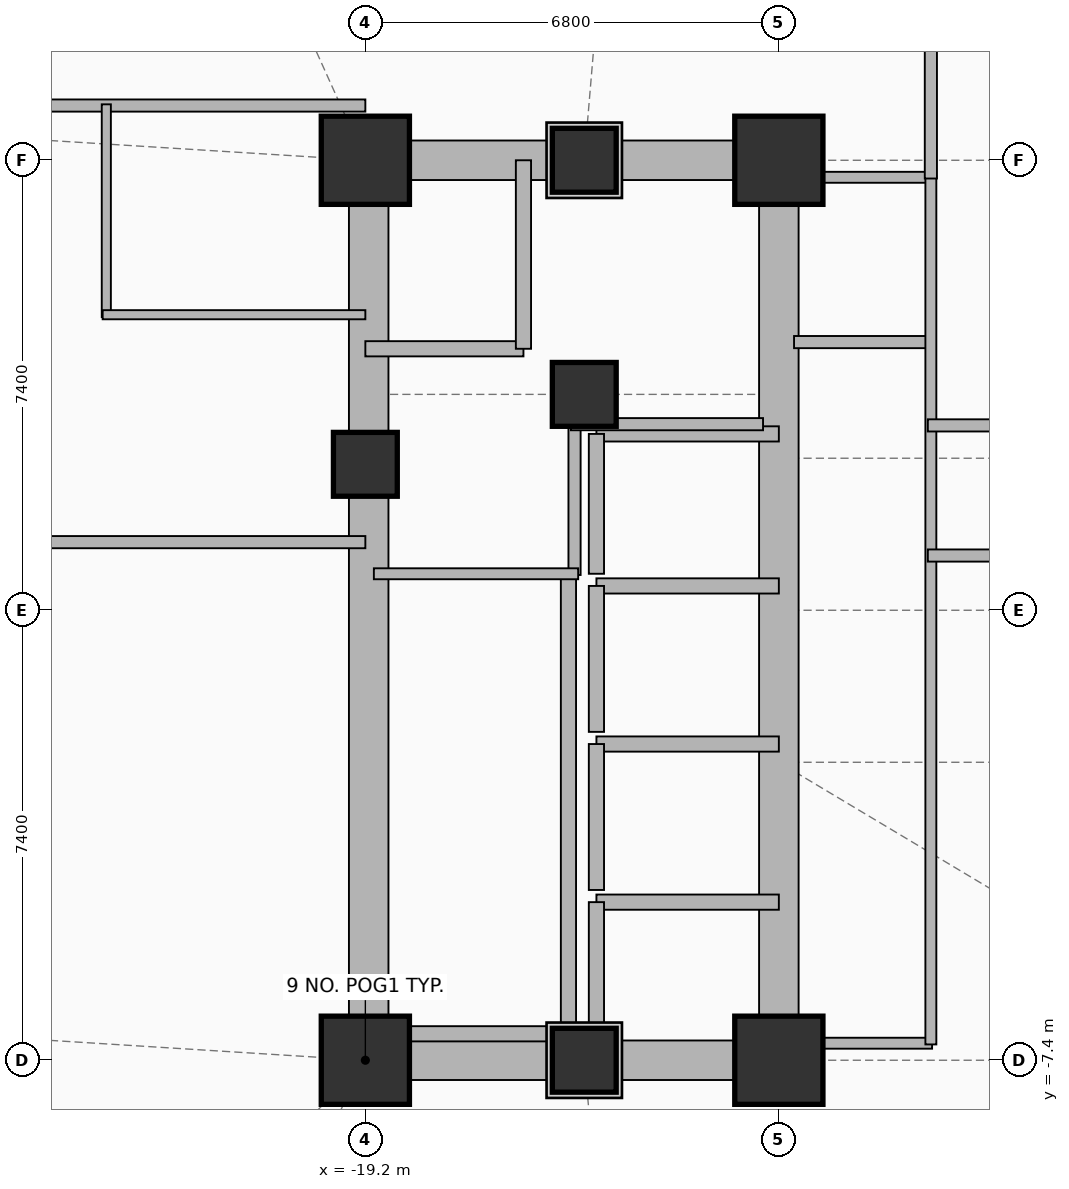
"""IFC4 building model, lengths in metres.
Left out: names, types, materials, properties, quantities, classifications, styles, units other than length and angle.
Written with IfcOpenShell. Run it as: python <this file> out.ifc"""

import sys

from ifc_helpers import new_model, si_unit, direction, frame, frame_2d, origin, origin_2d, place, context, subcontext, project, spatial, rectangle, extrude, element, fill, save


model = new_model("IFC4")
c1 = context("Model", 3, precision=1e-05, world=origin(), true_north=direction((0.0, 1.0)))
c2 = subcontext(c1, "Body", "Model", "MODEL_VIEW")
j1 = project(units=[si_unit("LENGTHUNIT", "METRE"), si_unit("PLANEANGLEUNIT", "RADIAN")], contexts=[c1])
p1 = place(None, origin())
s1 = spatial("IfcSite", under=j1, at=p1, CompositionType="ELEMENT")
p2 = place(p1, origin())
s2 = spatial("IfcBuilding", under=s1, at=p2, CompositionType="ELEMENT")
p3 = place(p2, frame((0.0, 0.0, 80.6)))
s3 = spatial("IfcBuildingStorey", under=s2, at=p3, CompositionType="ELEMENT", Elevation=80.6)
p4 = place(p3, frame((-19.2, -7.4, 0.0), z_axis=(0.0, 0.0, 1.0), x_axis=(1.0, 0.0, 0.0)))
e1 = element("IfcColumn", 1, at=p4, inside=s3, PredefinedType="COLUMN", context=c2, shape_type="SweptSolid", body=[
    extrude(rectangle(XDim=1.45, YDim=1.45, at=origin_2d()), origin(), (0.0, 0.0, 1.0), 5.2),
])
p5 = place(p3, frame((-19.2, 2.4, 0.0), z_axis=(0.0, 0.0, 1.0), x_axis=(1.0, 0.0, 0.0)))
e2 = element("IfcColumn", 2, at=p5, inside=s3, PredefinedType="COLUMN", context=c2, shape_type="SweptSolid", body=[
    extrude(rectangle(XDim=1.05, YDim=1.05, at=origin_2d()), origin(), (0.0, 0.0, 1.0), 5.2),
])
p6 = place(p3, frame((-19.2, 7.4, 0.0), z_axis=(0.0, 0.0, 1.0), x_axis=(1.0, 0.0, 0.0)))
e3 = element("IfcColumn", 3, at=p6, inside=s3, PredefinedType="COLUMN", context=c2, shape_type="SweptSolid", body=[
    extrude(rectangle(XDim=1.45, YDim=1.45, at=origin_2d()), origin(), (0.0, 0.0, 1.0), 5.2),
])
for number, where, z_axis, x_axis in (
    (4, (-15.6, -7.4, 0.0), (0.0, 0.0, 1.0), (1.0, 0.0, 0.0)),
    (5, (-15.6, 7.4, 0.0), (0.0, 0.0, 1.0), (1.0, 0.0, 0.0)),
):
    element("IfcColumn", number, at=place(p3, frame(where, z_axis=z_axis, x_axis=x_axis)), inside=s3, PredefinedType="COLUMN", context=c2, shape_type="SweptSolid", body=[
        extrude(rectangle(XDim=1.05, YDim=1.05, at=origin_2d()), origin(), (0.0, 0.0, 1.0), 5.2),
    ])
p7 = place(p3, frame((-12.4, -7.4, 0.0), z_axis=(0.0, 0.0, 1.0), x_axis=(1.0, 0.0, 0.0)))
e6 = element("IfcColumn", 6, at=p7, inside=s3, PredefinedType="COLUMN", context=c2, shape_type="SweptSolid", body=[
    extrude(rectangle(XDim=1.45, YDim=1.45, at=origin_2d()), origin(), (0.0, 0.0, 1.0), 5.2),
])
p8 = place(p3, frame((-15.6, 3.55, 0.0), z_axis=(0.0, 0.0, 1.0), x_axis=(1.0, 0.0, 0.0)))
e7 = element("IfcColumn", 7, at=p8, inside=s3, PredefinedType="COLUMN", context=c2, shape_type="SweptSolid", body=[
    extrude(rectangle(XDim=1.05, YDim=1.05, at=origin_2d()), origin(), (0.0, 0.0, 1.0), 5.2),
])
p9 = place(p3, frame((-12.4, 7.4, 0.0), z_axis=(0.0, 0.0, 1.0), x_axis=(1.0, 0.0, 0.0)))
e8 = element("IfcColumn", 8, at=p9, inside=s3, PredefinedType="COLUMN", context=c2, shape_type="SweptSolid", body=[
    extrude(rectangle(XDim=1.45, YDim=1.45, at=origin_2d()), origin(), (0.0, 0.0, 1.0), 5.2),
])
for number, where, z_axis, x_axis in (
    (9, (-19.525, -7.4, 0.0), (0.0, 0.0, 1.0), (1.0, 0.0, 0.0)),
    (10, (-19.525, 7.4, 0.0), (0.0, 0.0, 1.0), (1.0, 0.0, 0.0)),
):
    element("IfcWall", number, at=place(p3, frame(where, z_axis=z_axis, x_axis=x_axis)), inside=s3, PredefinedType="SHEAR", context=c2, shape_type="SweptSolid", body=[
        extrude(rectangle(XDim=7.45, YDim=0.65, at=frame_2d((3.725, 0.0))), origin(), (0.0, 0.0, 1.0), 4.8),
    ])
p10 = place(p3, frame((-19.145, -7.4, 0.0), z_axis=(0.0, 0.0, 1.0), x_axis=(0.0, 1.0, 0.0)))
e11 = element("IfcWall", 11, at=p10, inside=s3, PredefinedType="SHEAR", context=c2, shape_type="SweptSolid", body=[
    extrude(rectangle(XDim=14.8, YDim=0.65, at=frame_2d((7.4, 0.0))), origin(), (0.0, 0.0, 1.0), 4.8),
])
p11 = place(p10, frame((10.6, 0.0, 0.0)))
e12 = element("IfcOpeningElement", 12, at=p11, cuts=e11, PredefinedType="OPENING", context=c2, shape_type="SweptSolid", body=[
    extrude(rectangle(XDim=0.9, YDim=2.05, at=frame_2d((0.45, 1.025))), frame((0.0, 0.335, 0.0), z_axis=(0.0, -1.0, 0.0), x_axis=(1.0, 0.0, 0.0)), (0.0, 0.0, 1.0), 0.67),
])
p12 = place(p3, frame((-12.4, -7.4, 0.0), z_axis=(0.0, 0.0, 1.0), x_axis=(0.0, 1.0, 0.0)))
e13 = element("IfcWall", 13, at=p12, inside=s3, PredefinedType="SHEAR", context=c2, shape_type="SweptSolid", body=[
    extrude(rectangle(XDim=14.8, YDim=0.65, at=frame_2d((7.4, 0.0))), origin(), (0.0, 0.0, 1.0), 4.8),
])
p13 = place(p12, frame((0.85, 0.0, 0.0)))
e14 = element("IfcOpeningElement", 14, at=p13, cuts=e13, PredefinedType="OPENING", context=c2, shape_type="SweptSolid", body=[
    extrude(rectangle(XDim=1.1, YDim=2.05, at=frame_2d((0.55, 1.025))), frame((0.0, 0.335, 0.0), z_axis=(0.0, -1.0, 0.0), x_axis=(1.0, 0.0, 0.0)), (0.0, 0.0, 1.0), 0.67),
])
p14 = place(p12, frame((3.45, 0.0, 0.0)))
e15 = element("IfcOpeningElement", 15, at=p14, cuts=e13, PredefinedType="OPENING", context=c2, shape_type="SweptSolid", body=[
    extrude(rectangle(XDim=1.1, YDim=2.05, at=frame_2d((0.55, 1.025))), frame((0.0, 0.335, 0.0), z_axis=(0.0, -1.0, 0.0), x_axis=(1.0, 0.0, 0.0)), (0.0, 0.0, 1.0), 0.67),
])
p15 = place(p12, frame((10.53, 0.0, 0.0)))
e16 = element("IfcOpeningElement", 16, at=p15, cuts=e13, PredefinedType="OPENING", context=c2, shape_type="SweptSolid", body=[
    extrude(rectangle(XDim=1.1, YDim=2.05, at=frame_2d((0.55, 1.025))), frame((0.0, 0.335, 0.0), z_axis=(0.0, -1.0, 0.0), x_axis=(1.0, 0.0, 0.0)), (0.0, 0.0, 1.0), 0.67),
])
p16 = place(p3, frame((-15.86, -7.085, 0.0), z_axis=(0.0, 0.0, 1.0), x_axis=(0.0, 1.0, 0.0)))
e17 = element("IfcWall", 17, at=p16, inside=s3, PredefinedType="SOLIDWALL", context=c2, shape_type="SweptSolid", body=[
    extrude(rectangle(XDim=7.685, YDim=0.25, at=frame_2d((3.843, 0.0))), origin(), (0.0, 0.0, 1.0), 4.8),
])
p17 = place(p3, frame((-19.2, -6.965, 0.0), z_axis=(0.0, 0.0, 1.0), x_axis=(1.0, 0.0, 0.0)))
e18 = element("IfcWall", 18, at=p17, inside=s3, PredefinedType="SOLIDWALL", context=c2, shape_type="SweptSolid", body=[
    extrude(rectangle(XDim=3.46, YDim=0.25, at=frame_2d((1.73, 0.0))), origin(), (0.0, 0.0, 1.0), 4.8),
])
p18 = place(p3, frame((-19.2, 4.3, 0.0), z_axis=(0.0, 0.0, 1.0), x_axis=(1.0, 0.0, 0.0)))
e19 = element("IfcWall", 19, at=p18, inside=s3, PredefinedType="SOLIDWALL", context=c2, shape_type="SweptSolid", body=[
    extrude(rectangle(XDim=2.6, YDim=0.25, at=frame_2d((1.3, 0.0))), origin(), (0.0, 0.0, 1.0), 4.8),
])
p19 = place(p3, frame((-16.6, 4.3, 0.0), z_axis=(0.0, 0.0, 1.0), x_axis=(0.0, 1.0, 0.0)))
e20 = element("IfcWall", 20, at=p19, inside=s3, PredefinedType="SOLIDWALL", context=c2, shape_type="SweptSolid", body=[
    extrude(rectangle(XDim=3.1, YDim=0.25, at=frame_2d((1.55, 0.0))), origin(), (0.0, 0.0, 1.0), 4.8),
])
p20 = place(p19, frame((0.95, 0.0, 0.0)))
e21 = element("IfcOpeningElement", 21, at=p20, cuts=e20, PredefinedType="OPENING", context=c2, shape_type="SweptSolid", body=[
    extrude(rectangle(XDim=1.2, YDim=2.05, at=frame_2d((0.6, 1.025))), frame((0.0, 0.135, 0.0), z_axis=(0.0, -1.0, 0.0), x_axis=(1.0, 0.0, 0.0)), (0.0, 0.0, 1.0), 0.27),
])
p21 = place(p3, frame((-12.4, -4.8, 0.0), z_axis=(0.0, 0.0, 1.0), x_axis=(-1.0, 0.0, 0.0)))
e22 = element("IfcWall", 22, at=p21, inside=s3, PredefinedType="SOLIDWALL", context=c2, shape_type="SweptSolid", body=[
    extrude(rectangle(XDim=3.0, YDim=0.25, at=frame_2d((1.5, 0.0))), origin(), (0.0, 0.0, 1.0), 4.8),
])
p22 = place(p3, frame((-15.4, -4.8, 0.0), z_axis=(0.0, 0.0, 1.0), x_axis=(0.0, -1.0, 0.0)))
e23 = element("IfcWall", 23, at=p22, inside=s3, PredefinedType="SOLIDWALL", context=c2, shape_type="SweptSolid", body=[
    extrude(rectangle(XDim=2.6, YDim=0.25, at=frame_2d((1.3, 0.0))), origin(), (0.0, 0.0, 1.0), 4.8),
])
p23 = place(p3, frame((-12.4, -2.2, 0.0), z_axis=(0.0, 0.0, 1.0), x_axis=(-1.0, 0.0, 0.0)))
e24 = element("IfcWall", 24, at=p23, inside=s3, PredefinedType="SOLIDWALL", context=c2, shape_type="SweptSolid", body=[
    extrude(rectangle(XDim=3.0, YDim=0.25, at=frame_2d((1.5, 0.0))), origin(), (0.0, 0.0, 1.0), 4.8),
])
p24 = place(p3, frame((-15.4, -2.2, 0.0), z_axis=(0.0, 0.0, 1.0), x_axis=(0.0, -1.0, 0.0)))
e25 = element("IfcWall", 25, at=p24, inside=s3, PredefinedType="SOLIDWALL", context=c2, shape_type="SweptSolid", body=[
    extrude(rectangle(XDim=2.4, YDim=0.25, at=frame_2d((1.2, 0.0))), origin(), (0.0, 0.0, 1.0), 4.8),
])
p25 = place(p3, frame((-12.4, 0.4, 0.0), z_axis=(0.0, 0.0, 1.0), x_axis=(-1.0, 0.0, 0.0)))
e26 = element("IfcWall", 26, at=p25, inside=s3, PredefinedType="SOLIDWALL", context=c2, shape_type="SweptSolid", body=[
    extrude(rectangle(XDim=3.0, YDim=0.25, at=frame_2d((1.5, 0.0))), origin(), (0.0, 0.0, 1.0), 4.8),
])
p26 = place(p3, frame((-15.4, 0.4, 0.0), z_axis=(0.0, 0.0, 1.0), x_axis=(0.0, -1.0, 0.0)))
e27 = element("IfcWall", 27, at=p26, inside=s3, PredefinedType="SOLIDWALL", context=c2, shape_type="SweptSolid", body=[
    extrude(rectangle(XDim=2.4, YDim=0.25, at=frame_2d((1.2, 0.0))), origin(), (0.0, 0.0, 1.0), 4.8),
])
p27 = place(p3, frame((-12.4, 2.9, 0.0), z_axis=(0.0, 0.0, 1.0), x_axis=(-1.0, 0.0, 0.0)))
e28 = element("IfcWall", 28, at=p27, inside=s3, PredefinedType="SOLIDWALL", context=c2, shape_type="SweptSolid", body=[
    extrude(rectangle(XDim=3.0, YDim=0.25, at=frame_2d((1.5, 0.0))), origin(), (0.0, 0.0, 1.0), 4.8),
])
p28 = place(p3, frame((-15.4, 2.9, 0.0), z_axis=(0.0, 0.0, 1.0), x_axis=(0.0, -1.0, 0.0)))
e29 = element("IfcWall", 29, at=p28, inside=s3, PredefinedType="SOLIDWALL", context=c2, shape_type="SweptSolid", body=[
    extrude(rectangle(XDim=2.3, YDim=0.25, at=frame_2d((1.15, 0.0))), origin(), (0.0, 0.0, 1.0), 4.8),
])
p29 = place(p3, frame((-15.76, 0.58, 0.0), z_axis=(0.0, 0.0, 1.0), x_axis=(0.0, 1.0, 0.0)))
e30 = element("IfcWall", 30, at=p29, inside=s3, PredefinedType="PARTITIONING", context=c2, shape_type="SweptSolid", body=[
    extrude(rectangle(XDim=2.52, YDim=0.2, at=frame_2d((1.26, 0.0))), origin(), (0.0, 0.0, 1.0), 4.8),
])
p30 = place(p3, frame((-15.82, 3.06, 0.0), z_axis=(0.0, 0.0, 1.0), x_axis=(1.0, 0.0, 0.0)))
e31 = element("IfcWall", 31, at=p30, inside=s3, PredefinedType="PARTITIONING", context=c2, shape_type="SweptSolid", body=[
    extrude(rectangle(XDim=3.16, YDim=0.2, at=frame_2d((1.58, 0.0))), origin(), (0.0, 0.0, 1.0), 4.8),
])
p31 = place(p3, frame((-19.06, 0.6, 0.0), z_axis=(0.0, 0.0, 1.0), x_axis=(1.0, 0.0, 0.0)))
e32 = element("IfcWall", 32, at=p31, inside=s3, PredefinedType="PARTITIONING", context=c2, shape_type="SweptSolid", body=[
    extrude(rectangle(XDim=3.36, YDim=0.18, at=frame_2d((1.68, 0.0))), origin(), (0.0, 0.0, 1.0), 4.8),
])
p32 = place(p31, frame((1.155, 0.0, 0.0)))
e33 = element("IfcOpeningElement", 33, at=p32, cuts=e32, PredefinedType="OPENING", context=c2, shape_type="SweptSolid", body=[
    extrude(rectangle(XDim=1.05, YDim=2.05, at=frame_2d((0.525, 1.025))), frame((0.0, 0.1, 0.0), z_axis=(0.0, -1.0, 0.0), x_axis=(1.0, 0.0, 0.0)), (0.0, 0.0, 1.0), 0.2),
])
p33 = place(p3, frame((-12.15, 4.41, 0.0), z_axis=(0.0, 0.0, 1.0), x_axis=(1.0, 0.0, 0.0)))
e34 = element("IfcWall", 34, at=p33, inside=s3, PredefinedType="PARTITIONING", context=c2, shape_type="SweptSolid", body=[
    extrude(rectangle(XDim=2.27, YDim=0.2, at=frame_2d((1.135, 0.0))), origin(), (0.0, 0.0, 1.0), 4.8),
])
p34 = place(p33, frame((0.685, 0.0, 0.0)))
e35 = element("IfcOpeningElement", 35, at=p34, cuts=e34, PredefinedType="OPENING", context=c2, shape_type="SweptSolid", body=[
    extrude(rectangle(XDim=0.9, YDim=2.05, at=frame_2d((0.45, 1.025))), frame((0.0, 0.11, 0.0), z_axis=(0.0, -1.0, 0.0), x_axis=(1.0, 0.0, 0.0)), (0.0, 0.0, 1.0), 0.22),
])
for number, where, z_axis, x_axis in (
    (36, (-12.15, 7.12, 0.0), (0.0, 0.0, 1.0), (1.0, 0.0, 0.0)),
    (37, (-12.15, -7.12, 0.0), (0.0, 0.0, 1.0), (1.0, 0.0, 0.0)),
):
    element("IfcWall", number, at=place(p3, frame(where, z_axis=z_axis, x_axis=x_axis)), inside=s3, PredefinedType="PARTITIONING", context=c2, shape_type="SweptSolid", body=[
        extrude(rectangle(XDim=2.27, YDim=0.18, at=frame_2d((1.135, 0.0))), origin(), (0.0, 0.0, 1.0), 3.84),
    ])
p35 = place(p3, frame((-9.9, -7.14, 0.0), z_axis=(0.0, 0.0, 1.0), x_axis=(0.0, 1.0, 0.0)))
e38 = element("IfcWall", 38, at=p35, inside=s3, PredefinedType="PARTITIONING", context=c2, shape_type="SweptSolid", body=[
    extrude(rectangle(XDim=14.28, YDim=0.18, at=frame_2d((7.14, 0.0))), origin(), (0.0, 0.0, 1.0), 4.8),
])
p36 = place(p35, frame((8.689, 0.0, 0.0)))
e39 = element("IfcOpeningElement", 39, at=p36, cuts=e38, PredefinedType="OPENING", context=c2, shape_type="SweptSolid", body=[
    extrude(rectangle(XDim=0.9, YDim=2.05, at=frame_2d((0.45, 1.025))), frame((0.0, 0.1, 0.0), z_axis=(0.0, -1.0, 0.0), x_axis=(1.0, 0.0, 0.0)), (0.0, 0.0, 1.0), 0.2),
])
p37 = place(p3, frame((-9.95, 3.04, 0.0), z_axis=(0.0, 0.0, 1.0), x_axis=(1.0, 0.0, 0.0)))
e40 = element("IfcWall", 40, at=p37, inside=s3, PredefinedType="PARTITIONING", context=c2, shape_type="SweptSolid", body=[
    extrude(rectangle(XDim=19.9, YDim=0.2, at=frame_2d((9.95, 0.0))), origin(), (0.0, 0.0, 1.0), 4.8),
])
p38 = place(p37, frame((9.425, 0.0, 0.0)))
e41 = element("IfcOpeningElement", 41, at=p38, cuts=e40, PredefinedType="OPENING", context=c2, shape_type="SweptSolid", body=[
    extrude(rectangle(XDim=1.05, YDim=2.05, at=frame_2d((0.525, 1.025))), frame((0.0, 0.11, 0.0), z_axis=(0.0, -1.0, 0.0), x_axis=(1.0, 0.0, 0.0)), (0.0, 0.0, 1.0), 0.22),
])
p39 = place(p3, frame((-9.95, 0.9, 0.0), z_axis=(0.0, 0.0, 1.0), x_axis=(1.0, 0.0, 0.0)))
e42 = element("IfcWall", 42, at=p39, inside=s3, PredefinedType="PARTITIONING", context=c2, shape_type="SweptSolid", body=[
    extrude(rectangle(XDim=19.9, YDim=0.2, at=frame_2d((9.95, 0.0))), origin(), (0.0, 0.0, 1.0), 4.8),
])
p40 = place(p39, frame((9.425, 0.0, 0.0)))
e43 = element("IfcOpeningElement", 43, at=p40, cuts=e42, PredefinedType="OPENING", context=c2, shape_type="SweptSolid", body=[
    extrude(rectangle(XDim=1.05, YDim=2.05, at=frame_2d((0.525, 1.025))), frame((0.0, 0.11, 0.0), z_axis=(0.0, -1.0, 0.0), x_axis=(1.0, 0.0, 0.0)), (0.0, 0.0, 1.0), 0.22),
])
p41 = place(p3, frame((-33.41, 1.12, 0.0), z_axis=(0.0, 0.0, 1.0), x_axis=(1.0, 0.0, 0.0)))
e44 = element("IfcWall", 44, at=p41, inside=s3, PredefinedType="PARTITIONING", context=c2, shape_type="SweptSolid", body=[
    extrude(rectangle(XDim=14.21, YDim=0.2, at=frame_2d((7.105, 0.0))), origin(), (0.0, 0.0, 1.0), 4.8),
])
p42 = place(p3, frame((-33.41, 8.3, 0.0), z_axis=(0.0, 0.0, 1.0), x_axis=(1.0, 0.0, 0.0)))
e45 = element("IfcWall", 45, at=p42, inside=s3, PredefinedType="PARTITIONING", context=c2, shape_type="SweptSolid", body=[
    extrude(rectangle(XDim=14.21, YDim=0.2, at=frame_2d((7.105, 0.0))), origin(), (0.0, 0.0, 1.0), 3.69),
])
p43 = place(p3, frame((-23.46, 4.82, 0.0), z_axis=(0.0, 0.0, 1.0), x_axis=(0.0, 1.0, 0.0)))
e46 = element("IfcWall", 46, at=p43, inside=s3, PredefinedType="PLUMBINGWALL", context=c2, shape_type="SweptSolid", body=[
    extrude(rectangle(XDim=3.5, YDim=0.15, at=frame_2d((1.75, 0.0))), origin(), (0.0, 0.0, 1.0), 4.8),
])
p44 = place(p43, frame((1.25, 0.0, 0.0)))
e47 = element("IfcOpeningElement", 47, at=p44, cuts=e46, PredefinedType="OPENING", context=c2, shape_type="SweptSolid", body=[
    extrude(rectangle(XDim=1.0, YDim=2.05, at=frame_2d((0.5, 1.025))), frame((0.0, 0.085, 0.0), z_axis=(0.0, -1.0, 0.0), x_axis=(1.0, 0.0, 0.0)), (0.0, 0.0, 1.0), 0.17),
])
p45 = place(p3, frame((-23.52, 4.86, 0.0), z_axis=(0.0, 0.0, 1.0), x_axis=(1.0, 0.0, 0.0)))
e48 = element("IfcWall", 48, at=p45, inside=s3, PredefinedType="PLUMBINGWALL", context=c2, shape_type="SweptSolid", body=[
    extrude(rectangle(XDim=4.32, YDim=0.15, at=frame_2d((2.16, 0.0))), origin(), (0.0, 0.0, 1.0), 4.8),
])
p46 = place(p3, frame((-9.9, 7.1, 0.0), z_axis=(0.0, 0.0, 1.0), x_axis=(0.0, 1.0, 0.0)))
e49 = element("IfcWall", 49, at=p46, inside=s3, PredefinedType="PARTITIONING", context=c2, shape_type="SweptSolid", body=[
    extrude(rectangle(XDim=15.11, YDim=0.2, at=frame_2d((7.555, 0.0))), origin(), (0.0, 0.0, 1.0), 4.8),
])
p47 = place(p46, frame((8.239, 0.0, 0.0)))
e50 = element("IfcOpeningElement", 50, at=p47, cuts=e49, PredefinedType="OPENING", context=c2, shape_type="SweptSolid", body=[
    extrude(rectangle(XDim=1.05, YDim=2.05, at=frame_2d((0.525, 1.025))), frame((0.0, 0.11, 0.0), z_axis=(0.0, -1.0, 0.0), x_axis=(1.0, 0.0, 0.0)), (0.0, 0.0, 1.0), 0.22),
])
p48 = place(p20, origin())
e51 = element("IfcDoor", 51, at=p48, inside=s3, OperationType="SLIDING_TO_LEFT", PredefinedType="DOOR", context=c2, shape_type="SweptSolid", body=[
    extrude(rectangle(XDim=1.2, YDim=2.05, at=frame_2d((0.6, 1.025))), frame((0.0, 0.025, 0.0), z_axis=(0.0, -1.0, 0.0), x_axis=(1.0, 0.0, 0.0)), (0.0, 0.0, 1.0), 0.05),
])
fill(e21, e51)
p49 = place(p13, origin())
e52 = element("IfcDoor", 52, at=p49, inside=s3, OperationType="SLIDING_TO_LEFT", PredefinedType="DOOR", context=c2, shape_type="SweptSolid", body=[
    extrude(rectangle(XDim=1.1, YDim=2.05, at=frame_2d((0.55, 1.025))), frame((0.0, 0.025, 0.0), z_axis=(0.0, -1.0, 0.0), x_axis=(1.0, 0.0, 0.0)), (0.0, 0.0, 1.0), 0.05),
])
fill(e14, e52)
p50 = place(p14, origin())
e53 = element("IfcDoor", 53, at=p50, inside=s3, OperationType="SLIDING_TO_LEFT", PredefinedType="DOOR", context=c2, shape_type="SweptSolid", body=[
    extrude(rectangle(XDim=1.1, YDim=2.05, at=frame_2d((0.55, 1.025))), frame((0.0, 0.025, 0.0), z_axis=(0.0, -1.0, 0.0), x_axis=(1.0, 0.0, 0.0)), (0.0, 0.0, 1.0), 0.05),
])
fill(e15, e53)
p51 = place(p32, origin())
e54 = element("IfcDoor", 54, at=p51, inside=s3, OperationType="SINGLE_SWING_LEFT", PredefinedType="DOOR", context=c2, shape_type="SweptSolid", body=[
    extrude(rectangle(XDim=1.05, YDim=2.05, at=frame_2d((0.525, 1.025))), frame((0.0, 0.025, 0.0), z_axis=(0.0, -1.0, 0.0), x_axis=(1.0, 0.0, 0.0)), (0.0, 0.0, 1.0), 0.05),
])
fill(e33, e54)
p52 = place(p34, origin())
e55 = element("IfcDoor", 55, at=p52, inside=s3, OperationType="SINGLE_SWING_LEFT", PredefinedType="DOOR", context=c2, shape_type="SweptSolid", body=[
    extrude(rectangle(XDim=0.9, YDim=2.05, at=frame_2d((0.45, 1.025))), frame((0.0, 0.025, 0.0), z_axis=(0.0, -1.0, 0.0), x_axis=(1.0, 0.0, 0.0)), (0.0, 0.0, 1.0), 0.05),
])
fill(e35, e55)
p53 = place(p36, origin())
e56 = element("IfcDoor", 56, at=p53, inside=s3, OperationType="SINGLE_SWING_LEFT", PredefinedType="DOOR", context=c2, shape_type="SweptSolid", body=[
    extrude(rectangle(XDim=0.9, YDim=2.05, at=frame_2d((0.45, 1.025))), frame((0.0, 0.025, 0.0), z_axis=(0.0, -1.0, 0.0), x_axis=(1.0, 0.0, 0.0)), (0.0, 0.0, 1.0), 0.05),
])
fill(e39, e56)
p54 = place(p44, origin())
e57 = element("IfcDoor", 57, at=p54, inside=s3, OperationType="SINGLE_SWING_LEFT", PredefinedType="DOOR", context=c2, shape_type="SweptSolid", body=[
    extrude(rectangle(XDim=1.0, YDim=2.05, at=frame_2d((0.5, 1.025))), frame((0.0, 0.025, 0.0), z_axis=(0.0, -1.0, 0.0), x_axis=(1.0, 0.0, 0.0)), (0.0, 0.0, 1.0), 0.05),
])
fill(e47, e57)
p55 = place(p15, origin())
e58 = element("IfcDoor", 58, at=p55, inside=s3, OperationType="SINGLE_SWING_LEFT", PredefinedType="DOOR", context=c2, shape_type="SweptSolid", body=[
    extrude(rectangle(XDim=1.1, YDim=2.05, at=frame_2d((0.55, 1.025))), frame((0.0, 0.025, 0.0), z_axis=(0.0, -1.0, 0.0), x_axis=(1.0, 0.0, 0.0)), (0.0, 0.0, 1.0), 0.05),
])
fill(e16, e58)
p56 = place(p11, origin())
e59 = element("IfcDoor", 59, at=p56, inside=s3, OperationType="SINGLE_SWING_LEFT", PredefinedType="DOOR", context=c2, shape_type="SweptSolid", body=[
    extrude(rectangle(XDim=0.9, YDim=2.05, at=frame_2d((0.45, 1.025))), frame((0.0, 0.025, 0.0), z_axis=(0.0, -1.0, 0.0), x_axis=(1.0, 0.0, 0.0)), (0.0, 0.0, 1.0), 0.05),
])
fill(e12, e59)
save(model, sys.argv[1])
